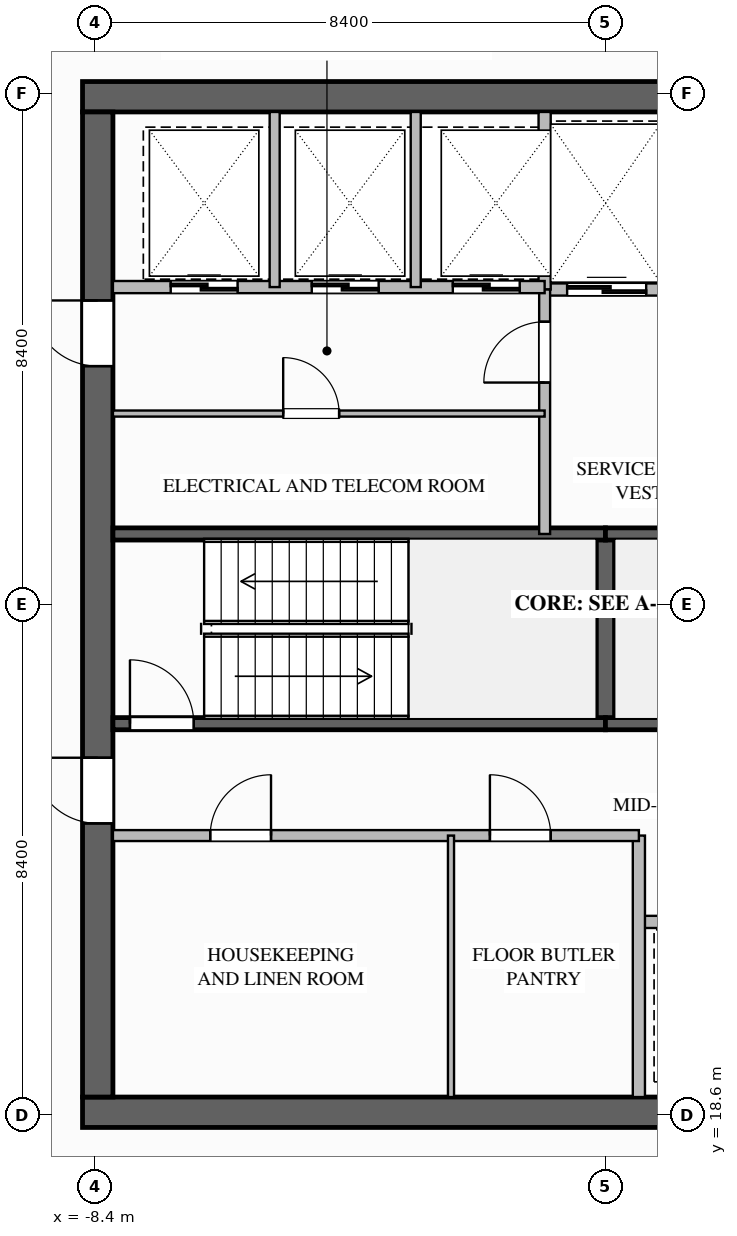
"""IFC4 building model, lengths in metres.
Left out: names, types, materials, properties, quantities, classifications, styles, units other than length and angle.
Written with IfcOpenShell. Run it as: python <this file> out.ifc"""

import sys

from ifc_helpers import new_model, si_unit, direction, frame, frame_2d, origin, place, context, subcontext, project, spatial, rectangle, extrude, element, fill, save


model = new_model("IFC4")
c1 = context("Model", 3, precision=1e-05, world=origin(), true_north=direction((0.0, 1.0)))
c2 = subcontext(c1, "Body", "Model", "MODEL_VIEW")
j1 = project(units=[si_unit("LENGTHUNIT", "METRE"), si_unit("PLANEANGLEUNIT", "RADIAN")], contexts=[c1])
p1 = place(None, origin())
s1 = spatial("IfcSite", under=j1, at=p1, CompositionType="ELEMENT")
p2 = place(p1, origin())
s2 = spatial("IfcBuilding", under=s1, at=p2, CompositionType="ELEMENT")
p3 = place(p2, frame((0.0, 0.0, 145.8)))
s3 = spatial("IfcBuildingStorey", under=s2, at=p3, CompositionType="ELEMENT", Elevation=145.8)
for number, where, z_axis, x_axis in (
    (1, (-8.6, 35.35, 0.0), (0.0, 0.0, 1.0), (1.0, 0.0, 0.0)),
    (2, (8.6, 18.65, 0.0), (0.0, 0.0, 1.0), (-1.0, 0.0, 0.0)),
):
    element("IfcWall", number, at=place(p3, frame(where, z_axis=z_axis, x_axis=x_axis)), inside=s3, PredefinedType="SHEAR", context=c2, shape_type="SweptSolid", body=[
        extrude(rectangle(XDim=17.2, YDim=0.5, at=frame_2d((8.6, 0.0))), origin(), (0.0, 0.0, 1.0), 4.6),
    ])
p4 = place(p3, frame((-8.35, 18.9, 0.0), z_axis=(0.0, 0.0, 1.0), x_axis=(0.0, 1.0, 0.0)))
e3 = element("IfcWall", 3, at=p4, inside=s3, PredefinedType="SHEAR", context=c2, shape_type="SweptSolid", body=[
    extrude(rectangle(XDim=16.2, YDim=0.5, at=frame_2d((8.1, 0.0))), origin(), (0.0, 0.0, 1.0), 4.6),
])
p5 = place(p4, frame((12.02, 0.0, 0.0)))
e4 = element("IfcOpeningElement", 4, at=p5, cuts=e3, PredefinedType="OPENING", context=c2, shape_type="SweptSolid", body=[
    extrude(rectangle(XDim=1.08, YDim=2.04, at=frame_2d((0.54, 1.02))), frame((0.0, 0.26, 0.0), z_axis=(0.0, -1.0, 0.0), x_axis=(1.0, 0.0, 0.0)), (0.0, 0.0, 1.0), 0.52),
])
p6 = place(p4, frame((4.5, 0.0, 0.0)))
e5 = element("IfcOpeningElement", 5, at=p6, cuts=e3, PredefinedType="OPENING", context=c2, shape_type="SweptSolid", body=[
    extrude(rectangle(XDim=1.08, YDim=2.04, at=frame_2d((0.54, 1.02))), frame((0.0, 0.26, 0.0), z_axis=(0.0, -1.0, 0.0), x_axis=(1.0, 0.0, 0.0)), (0.0, 0.0, 1.0), 0.52),
])
p7 = place(p3, frame((0.0, 25.04, 0.0), z_axis=(0.0, 0.0, 1.0), x_axis=(0.0, 1.0, 0.0)))
e6 = element("IfcWall", 6, at=p7, inside=s3, PredefinedType="SOLIDWALL", context=c2, shape_type="SweptSolid", body=[
    extrude(rectangle(XDim=3.12, YDim=0.3, at=frame_2d((1.56, 0.0))), origin(), (0.0, 0.0, 1.0), 4.34),
])
p8 = place(p3, frame((-8.1, 25.04, 0.0), z_axis=(0.0, 0.0, 1.0), x_axis=(1.0, 0.0, 0.0)))
e7 = element("IfcWall", 7, at=p8, inside=s3, PredefinedType="SOLIDWALL", context=c2, shape_type="SweptSolid", body=[
    extrude(rectangle(XDim=8.1, YDim=0.2, at=frame_2d((4.05, 0.0))), origin(), (0.0, 0.0, 1.0), 4.34),
])
p9 = place(p8, frame((0.28, 0.0, 0.0)))
e8 = element("IfcOpeningElement", 8, at=p9, cuts=e7, PredefinedType="OPENING", context=c2, shape_type="SweptSolid", body=[
    extrude(rectangle(XDim=1.05, YDim=2.1, at=frame_2d((0.525, 1.05))), frame((0.0, 0.11, 0.0), z_axis=(0.0, -1.0, 0.0), x_axis=(1.0, 0.0, 0.0)), (0.0, 0.0, 1.0), 0.22),
])
for number, where, z_axis, x_axis in (
    (9, (-8.1, 28.16, 0.0), (0.0, 0.0, 1.0), (1.0, 0.0, 0.0)),
    (10, (0.0, 25.04, 0.0), (0.0, 0.0, 1.0), (1.0, 0.0, 0.0)),
):
    element("IfcWall", number, at=place(p3, frame(where, z_axis=z_axis, x_axis=x_axis)), inside=s3, PredefinedType="SOLIDWALL", context=c2, shape_type="SweptSolid", body=[
        extrude(rectangle(XDim=8.1, YDim=0.2, at=frame_2d((4.05, 0.0))), origin(), (0.0, 0.0, 1.0), 4.34),
    ])
p10 = place(p3, frame((8.1, 28.16, 0.0), z_axis=(0.0, 0.0, 1.0), x_axis=(-1.0, 0.0, 0.0)))
e11 = element("IfcWall", 11, at=p10, inside=s3, PredefinedType="SOLIDWALL", context=c2, shape_type="SweptSolid", body=[
    extrude(rectangle(XDim=8.1, YDim=0.2, at=frame_2d((4.05, 0.0))), origin(), (0.0, 0.0, 1.0), 4.34),
])
p11 = place(p10, frame((0.28, 0.0, 0.0)))
e12 = element("IfcOpeningElement", 12, at=p11, cuts=e11, PredefinedType="OPENING", context=c2, shape_type="SweptSolid", body=[
    extrude(rectangle(XDim=1.05, YDim=2.1, at=frame_2d((0.525, 1.05))), frame((0.0, 0.11, 0.0), z_axis=(0.0, -1.0, 0.0), x_axis=(1.0, 0.0, 0.0)), (0.0, 0.0, 1.0), 0.22),
])
p12 = place(p3, frame((-1.0, 32.18, 0.0), z_axis=(0.0, 0.0, 1.0), x_axis=(1.0, 0.0, 0.0)))
e13 = element("IfcWall", 13, at=p12, inside=s3, PredefinedType="SOLIDWALL", context=c2, shape_type="SweptSolid", body=[
    extrude(rectangle(XDim=4.1, YDim=0.2, at=frame_2d((2.05, 0.0))), origin(), (0.0, 0.0, 1.0), 4.34),
])
p13 = place(p12, frame((0.37, 0.0, 0.0)))
e14 = element("IfcOpeningElement", 14, at=p13, cuts=e13, PredefinedType="OPENING", context=c2, shape_type="SweptSolid", body=[
    extrude(rectangle(XDim=1.3, YDim=2.2, at=frame_2d((0.65, 1.1))), frame((0.0, 0.11, 0.0), z_axis=(0.0, -1.0, 0.0), x_axis=(1.0, 0.0, 0.0)), (0.0, 0.0, 1.0), 0.22),
])
p14 = place(p12, frame((2.33, 0.0, 0.0)))
e15 = element("IfcOpeningElement", 15, at=p14, cuts=e13, PredefinedType="OPENING", context=c2, shape_type="SweptSolid", body=[
    extrude(rectangle(XDim=1.3, YDim=2.2, at=frame_2d((0.65, 1.1))), frame((0.0, 0.11, 0.0), z_axis=(0.0, -1.0, 0.0), x_axis=(1.0, 0.0, 0.0)), (0.0, 0.0, 1.0), 0.22),
])
p15 = place(p3, frame((-1.0, 32.18, 0.0), z_axis=(0.0, 0.0, 1.0), x_axis=(0.0, 1.0, 0.0)))
e16 = element("IfcWall", 16, at=p15, inside=s3, PredefinedType="SOLIDWALL", context=c2, shape_type="SweptSolid", body=[
    extrude(rectangle(XDim=2.92, YDim=0.2, at=frame_2d((1.46, 0.0))), origin(), (0.0, 0.0, 1.0), 4.34),
])
p16 = place(p3, frame((-1.0, 28.16, 0.0), z_axis=(0.0, 0.0, 1.0), x_axis=(0.0, 1.0, 0.0)))
e17 = element("IfcWall", 17, at=p16, inside=s3, PredefinedType="SOLIDWALL", context=c2, shape_type="SweptSolid", body=[
    extrude(rectangle(XDim=4.02, YDim=0.18, at=frame_2d((2.01, 0.0))), origin(), (0.0, 0.0, 1.0), 4.34),
])
p17 = place(p16, frame((2.49, 0.0, 0.0)))
e18 = element("IfcOpeningElement", 18, at=p17, cuts=e17, PredefinedType="OPENING", context=c2, shape_type="SweptSolid", body=[
    extrude(rectangle(XDim=1.0, YDim=2.1, at=frame_2d((0.5, 1.05))), frame((0.0, 0.1, 0.0), z_axis=(0.0, -1.0, 0.0), x_axis=(1.0, 0.0, 0.0)), (0.0, 0.0, 1.0), 0.2),
])
p18 = place(p3, frame((-8.1, 32.22, 0.0), z_axis=(0.0, 0.0, 1.0), x_axis=(1.0, 0.0, 0.0)))
e19 = element("IfcWall", 19, at=p18, inside=s3, PredefinedType="SOLIDWALL", context=c2, shape_type="SweptSolid", body=[
    extrude(rectangle(XDim=7.1, YDim=0.2, at=frame_2d((3.55, 0.0))), origin(), (0.0, 0.0, 1.0), 4.34),
])
p19 = place(p18, frame((0.95, 0.0, 0.0)))
e20 = element("IfcOpeningElement", 20, at=p19, cuts=e19, PredefinedType="OPENING", context=c2, shape_type="SweptSolid", body=[
    extrude(rectangle(XDim=1.1, YDim=2.2, at=frame_2d((0.55, 1.1))), frame((0.0, 0.11, 0.0), z_axis=(0.0, -1.0, 0.0), x_axis=(1.0, 0.0, 0.0)), (0.0, 0.0, 1.0), 0.22),
])
p20 = place(p18, frame((3.27, 0.0, 0.0)))
e21 = element("IfcOpeningElement", 21, at=p20, cuts=e19, PredefinedType="OPENING", context=c2, shape_type="SweptSolid", body=[
    extrude(rectangle(XDim=1.1, YDim=2.2, at=frame_2d((0.55, 1.1))), frame((0.0, 0.11, 0.0), z_axis=(0.0, -1.0, 0.0), x_axis=(1.0, 0.0, 0.0)), (0.0, 0.0, 1.0), 0.22),
])
p21 = place(p18, frame((5.59, 0.0, 0.0)))
e22 = element("IfcOpeningElement", 22, at=p21, cuts=e19, PredefinedType="OPENING", context=c2, shape_type="SweptSolid", body=[
    extrude(rectangle(XDim=1.1, YDim=2.2, at=frame_2d((0.55, 1.1))), frame((0.0, 0.11, 0.0), z_axis=(0.0, -1.0, 0.0), x_axis=(1.0, 0.0, 0.0)), (0.0, 0.0, 1.0), 0.22),
])
for number, where, z_axis, x_axis in (
    (23, (-5.44, 32.22, 0.0), (0.0, 0.0, 1.0), (0.0, 1.0, 0.0)),
    (24, (-3.12, 32.22, 0.0), (0.0, 0.0, 1.0), (0.0, 1.0, 0.0)),
):
    element("IfcWall", number, at=place(p3, frame(where, z_axis=z_axis, x_axis=x_axis)), inside=s3, PredefinedType="PARTITIONING", context=c2, shape_type="SweptSolid", body=[
        extrude(rectangle(XDim=2.88, YDim=0.165, at=frame_2d((1.44, 0.0))), origin(), (0.0, 0.0, 1.0), 4.34),
    ])
p22 = place(p3, frame((-8.1, 30.14, 0.0), z_axis=(0.0, 0.0, 1.0), x_axis=(1.0, 0.0, 0.0)))
e25 = element("IfcWall", 25, at=p22, inside=s3, PredefinedType="PARTITIONING", context=c2, shape_type="SweptSolid", body=[
    extrude(rectangle(XDim=7.1, YDim=0.1, at=frame_2d((3.55, 0.0))), origin(), (0.0, 0.0, 1.0), 4.34),
])
p23 = place(p22, frame((2.8, 0.0, 0.0)))
e26 = element("IfcOpeningElement", 26, at=p23, cuts=e25, PredefinedType="OPENING", context=c2, shape_type="SweptSolid", body=[
    extrude(rectangle(XDim=0.92, YDim=2.1, at=frame_2d((0.46, 1.05))), frame((0.0, 0.06, 0.0), z_axis=(0.0, -1.0, 0.0), x_axis=(1.0, 0.0, 0.0)), (0.0, 0.0, 1.0), 0.12),
])
p24 = place(p3, frame((8.1, 21.78, 0.0), z_axis=(0.0, 0.0, 1.0), x_axis=(-1.0, 0.0, 0.0)))
e27 = element("IfcWall", 27, at=p24, inside=s3, PredefinedType="SOLIDWALL", context=c2, shape_type="SweptSolid", body=[
    extrude(rectangle(XDim=7.55, YDim=0.2, at=frame_2d((3.775, 0.0))), origin(), (0.0, 0.0, 1.0), 4.34),
])
p25 = place(p24, frame((5.75, 0.0, 0.0)))
e28 = element("IfcOpeningElement", 28, at=p25, cuts=e27, PredefinedType="OPENING", context=c2, shape_type="SweptSolid", body=[
    extrude(rectangle(XDim=1.1, YDim=2.2, at=frame_2d((0.55, 1.1))), frame((0.0, 0.11, 0.0), z_axis=(0.0, -1.0, 0.0), x_axis=(1.0, 0.0, 0.0)), (0.0, 0.0, 1.0), 0.22),
])
p26 = place(p24, frame((3.35, 0.0, 0.0)))
e29 = element("IfcOpeningElement", 29, at=p26, cuts=e27, PredefinedType="OPENING", context=c2, shape_type="SweptSolid", body=[
    extrude(rectangle(XDim=1.1, YDim=2.2, at=frame_2d((0.55, 1.1))), frame((0.0, 0.11, 0.0), z_axis=(0.0, -1.0, 0.0), x_axis=(1.0, 0.0, 0.0)), (0.0, 0.0, 1.0), 0.22),
])
p27 = place(p24, frame((0.95, 0.0, 0.0)))
e30 = element("IfcOpeningElement", 30, at=p27, cuts=e27, PredefinedType="OPENING", context=c2, shape_type="SweptSolid", body=[
    extrude(rectangle(XDim=1.1, YDim=2.2, at=frame_2d((0.55, 1.1))), frame((0.0, 0.11, 0.0), z_axis=(0.0, -1.0, 0.0), x_axis=(1.0, 0.0, 0.0)), (0.0, 0.0, 1.0), 0.22),
])
p28 = place(p3, frame((0.55, 18.9, 0.0), z_axis=(0.0, 0.0, 1.0), x_axis=(0.0, 1.0, 0.0)))
e31 = element("IfcWall", 31, at=p28, inside=s3, PredefinedType="SOLIDWALL", context=c2, shape_type="SweptSolid", body=[
    extrude(rectangle(XDim=4.3, YDim=0.2, at=frame_2d((2.15, 0.0))), origin(), (0.0, 0.0, 1.0), 4.34),
])
p29 = place(p3, frame((-8.1, 23.2, 0.0), z_axis=(0.0, 0.0, 1.0), x_axis=(1.0, 0.0, 0.0)))
e32 = element("IfcWall", 32, at=p29, inside=s3, PredefinedType="SOLIDWALL", context=c2, shape_type="SweptSolid", body=[
    extrude(rectangle(XDim=8.65, YDim=0.18, at=frame_2d((4.325, 0.0))), origin(), (0.0, 0.0, 1.0), 4.34),
])
p30 = place(p29, frame((1.6, 0.0, 0.0)))
e33 = element("IfcOpeningElement", 33, at=p30, cuts=e32, PredefinedType="OPENING", context=c2, shape_type="SweptSolid", body=[
    extrude(rectangle(XDim=1.0, YDim=2.1, at=frame_2d((0.5, 1.05))), frame((0.0, 0.1, 0.0), z_axis=(0.0, -1.0, 0.0), x_axis=(1.0, 0.0, 0.0)), (0.0, 0.0, 1.0), 0.2),
])
p31 = place(p29, frame((6.2, 0.0, 0.0)))
e34 = element("IfcOpeningElement", 34, at=p31, cuts=e32, PredefinedType="OPENING", context=c2, shape_type="SweptSolid", body=[
    extrude(rectangle(XDim=1.0, YDim=2.1, at=frame_2d((0.5, 1.05))), frame((0.0, 0.1, 0.0), z_axis=(0.0, -1.0, 0.0), x_axis=(1.0, 0.0, 0.0)), (0.0, 0.0, 1.0), 0.2),
])
p32 = place(p3, frame((-2.54, 18.9, 0.0), z_axis=(0.0, 0.0, 1.0), x_axis=(0.0, 1.0, 0.0)))
e35 = element("IfcWall", 35, at=p32, inside=s3, PredefinedType="PARTITIONING", context=c2, shape_type="SweptSolid", body=[
    extrude(rectangle(XDim=4.3, YDim=0.1, at=frame_2d((2.15, 0.0))), origin(), (0.0, 0.0, 1.0), 4.34),
])
p33 = place(p9, origin())
e36 = element("IfcDoor", 36, at=p33, inside=s3, OperationType="SINGLE_SWING_LEFT", PredefinedType="DOOR", context=c2, shape_type="SweptSolid", body=[
    extrude(rectangle(XDim=1.05, YDim=2.1, at=frame_2d((0.525, 1.05))), frame((0.0, 0.025, 0.0), z_axis=(0.0, -1.0, 0.0), x_axis=(1.0, 0.0, 0.0)), (0.0, 0.0, 1.0), 0.05),
])
fill(e8, e36)
p34 = place(p13, origin())
e37 = element("IfcDoor", 37, at=p34, inside=s3, OperationType="SLIDING_TO_LEFT", PredefinedType="DOOR", context=c2, shape_type="SweptSolid", body=[
    extrude(rectangle(XDim=1.3, YDim=2.2, at=frame_2d((0.65, 1.1))), frame((0.0, 0.025, 0.0), z_axis=(0.0, -1.0, 0.0), x_axis=(1.0, 0.0, 0.0)), (0.0, 0.0, 1.0), 0.05),
])
fill(e14, e37)
p35 = place(p17, origin())
e38 = element("IfcDoor", 38, at=p35, inside=s3, OperationType="SINGLE_SWING_LEFT", PredefinedType="DOOR", context=c2, shape_type="SweptSolid", body=[
    extrude(rectangle(XDim=1.0, YDim=2.1, at=frame_2d((0.5, 1.05))), frame((0.0, 0.025, 0.0), z_axis=(0.0, -1.0, 0.0), x_axis=(1.0, 0.0, 0.0)), (0.0, 0.0, 1.0), 0.05),
])
fill(e18, e38)
p36 = place(p19, origin())
e39 = element("IfcDoor", 39, at=p36, inside=s3, OperationType="SLIDING_TO_LEFT", PredefinedType="DOOR", context=c2, shape_type="SweptSolid", body=[
    extrude(rectangle(XDim=1.1, YDim=2.2, at=frame_2d((0.55, 1.1))), frame((0.0, 0.025, 0.0), z_axis=(0.0, -1.0, 0.0), x_axis=(1.0, 0.0, 0.0)), (0.0, 0.0, 1.0), 0.05),
])
fill(e20, e39)
p37 = place(p20, origin())
e40 = element("IfcDoor", 40, at=p37, inside=s3, OperationType="SLIDING_TO_LEFT", PredefinedType="DOOR", context=c2, shape_type="SweptSolid", body=[
    extrude(rectangle(XDim=1.1, YDim=2.2, at=frame_2d((0.55, 1.1))), frame((0.0, 0.025, 0.0), z_axis=(0.0, -1.0, 0.0), x_axis=(1.0, 0.0, 0.0)), (0.0, 0.0, 1.0), 0.05),
])
fill(e21, e40)
p38 = place(p21, origin())
e41 = element("IfcDoor", 41, at=p38, inside=s3, OperationType="SLIDING_TO_LEFT", PredefinedType="DOOR", context=c2, shape_type="SweptSolid", body=[
    extrude(rectangle(XDim=1.1, YDim=2.2, at=frame_2d((0.55, 1.1))), frame((0.0, 0.025, 0.0), z_axis=(0.0, -1.0, 0.0), x_axis=(1.0, 0.0, 0.0)), (0.0, 0.0, 1.0), 0.05),
])
fill(e22, e41)
p39 = place(p5, origin())
e42 = element("IfcDoor", 42, at=p39, inside=s3, OperationType="SINGLE_SWING_RIGHT", PredefinedType="DOOR", context=c2, shape_type="SweptSolid", body=[
    extrude(rectangle(XDim=1.08, YDim=2.04, at=frame_2d((0.54, 1.02))), frame((0.0, 0.025, 0.0), z_axis=(0.0, -1.0, 0.0), x_axis=(1.0, 0.0, 0.0)), (0.0, 0.0, 1.0), 0.05),
])
fill(e4, e42)
p40 = place(p23, origin())
e43 = element("IfcDoor", 43, at=p40, inside=s3, OperationType="SINGLE_SWING_LEFT", PredefinedType="DOOR", context=c2, shape_type="SweptSolid", body=[
    extrude(rectangle(XDim=0.92, YDim=2.1, at=frame_2d((0.46, 1.05))), frame((0.0, 0.025, 0.0), z_axis=(0.0, -1.0, 0.0), x_axis=(1.0, 0.0, 0.0)), (0.0, 0.0, 1.0), 0.05),
])
fill(e26, e43)
p41 = place(p6, origin())
e44 = element("IfcDoor", 44, at=p41, inside=s3, OperationType="SINGLE_SWING_RIGHT", PredefinedType="DOOR", context=c2, shape_type="SweptSolid", body=[
    extrude(rectangle(XDim=1.08, YDim=2.04, at=frame_2d((0.54, 1.02))), frame((0.0, 0.025, 0.0), z_axis=(0.0, -1.0, 0.0), x_axis=(1.0, 0.0, 0.0)), (0.0, 0.0, 1.0), 0.05),
])
fill(e5, e44)
p42 = place(p30, origin())
e45 = element("IfcDoor", 45, at=p42, inside=s3, OperationType="SINGLE_SWING_RIGHT", PredefinedType="DOOR", context=c2, shape_type="SweptSolid", body=[
    extrude(rectangle(XDim=1.0, YDim=2.1, at=frame_2d((0.5, 1.05))), frame((0.0, 0.025, 0.0), z_axis=(0.0, -1.0, 0.0), x_axis=(1.0, 0.0, 0.0)), (0.0, 0.0, 1.0), 0.05),
])
fill(e33, e45)
p43 = place(p31, origin())
e46 = element("IfcDoor", 46, at=p43, inside=s3, OperationType="SINGLE_SWING_LEFT", PredefinedType="DOOR", context=c2, shape_type="SweptSolid", body=[
    extrude(rectangle(XDim=1.0, YDim=2.1, at=frame_2d((0.5, 1.05))), frame((0.0, 0.025, 0.0), z_axis=(0.0, -1.0, 0.0), x_axis=(1.0, 0.0, 0.0)), (0.0, 0.0, 1.0), 0.05),
])
fill(e34, e46)
save(model, sys.argv[1])
